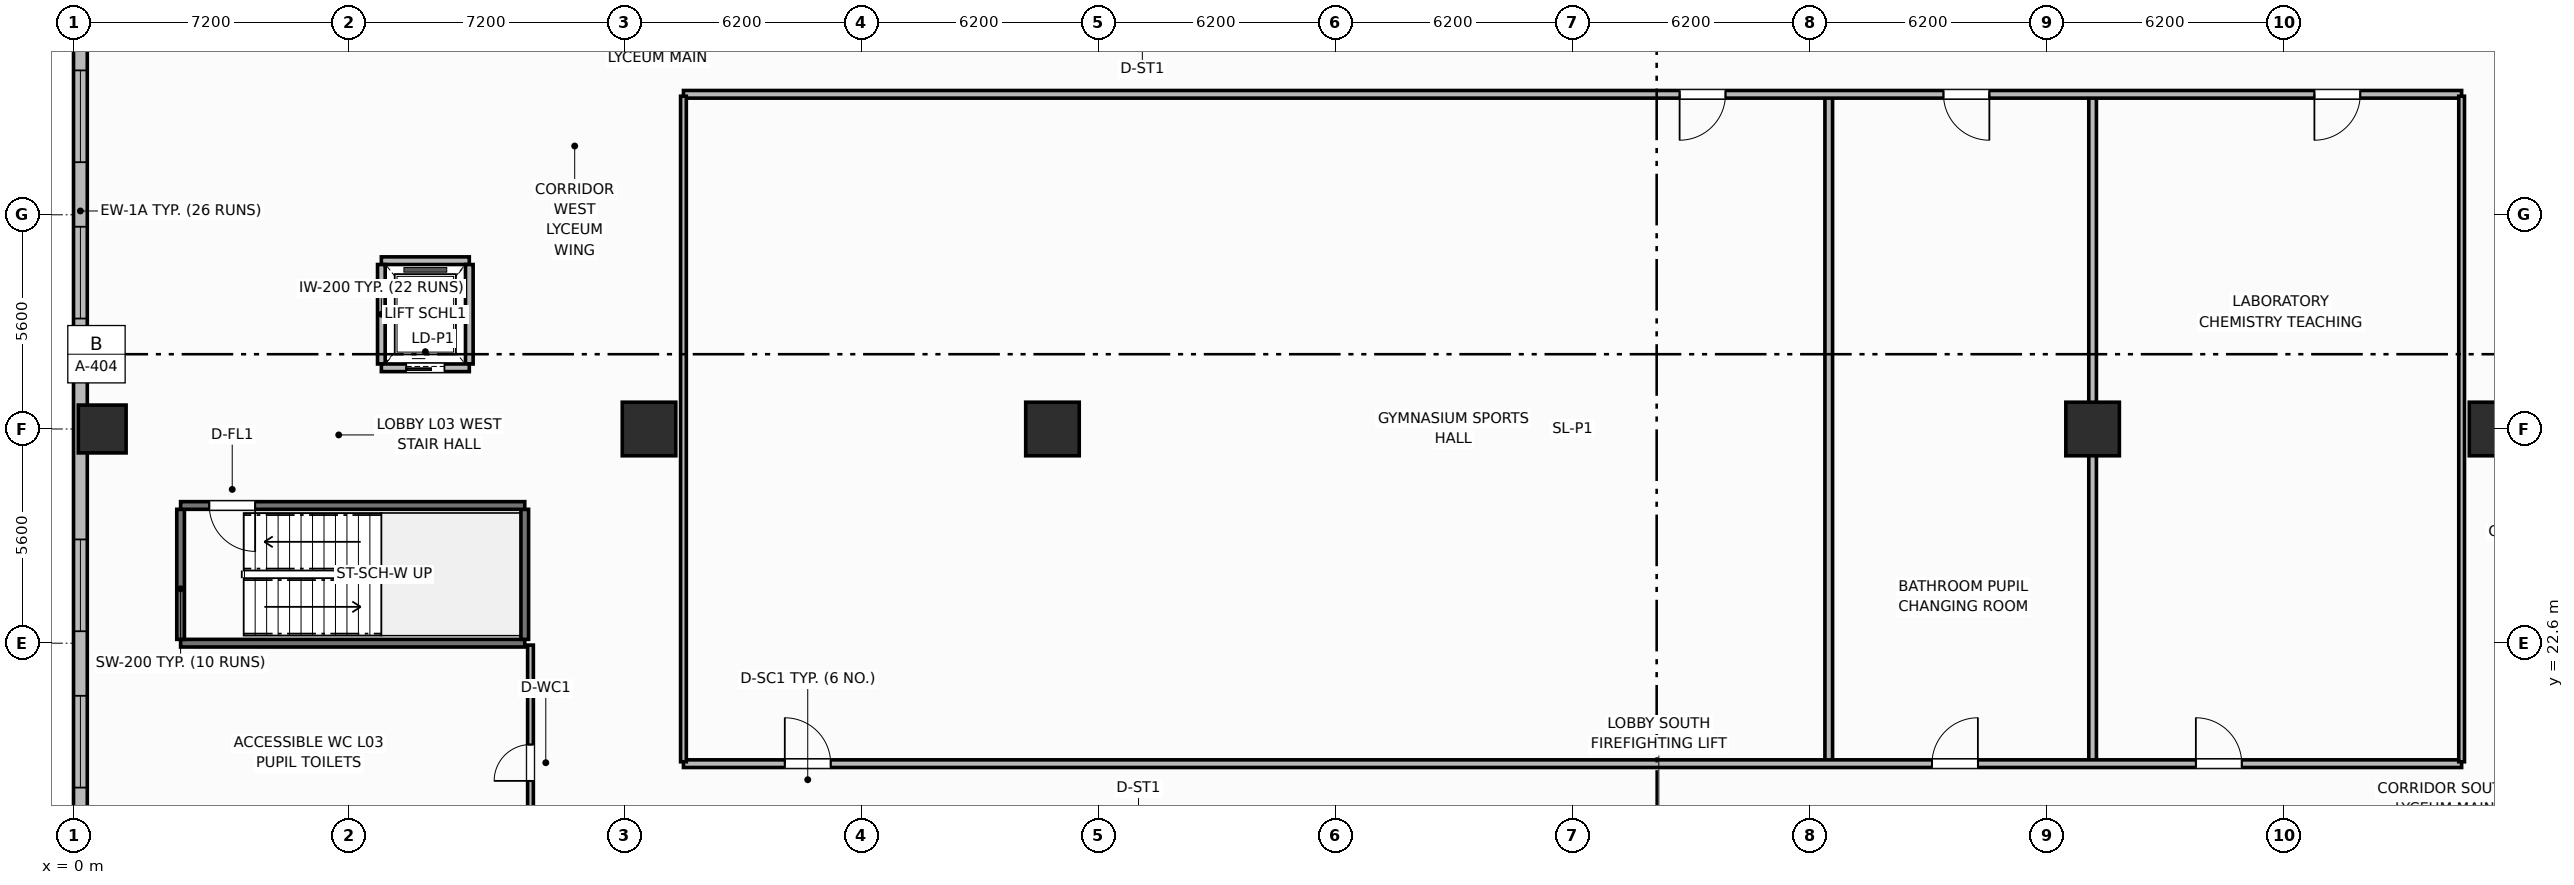
"""IFC4 building model, lengths in metres.
Left out: names, types, materials, properties, quantities, classifications, styles, units other than length and angle.
Written with IfcOpenShell. Run it as: python <this file> out.ifc"""

import sys

from ifc_helpers import new_model, si_unit, direction, frame, frame_2d, origin, origin_2d, place, context, subcontext, project, spatial, rectangle, extrude, element, fill, save


model = new_model("IFC4")
c1 = context("Model", 3, precision=1e-05, world=origin(), true_north=direction((0.0, 1.0)))
c2 = subcontext(c1, "Body", "Model", "MODEL_VIEW")
j1 = project(units=[si_unit("LENGTHUNIT", "METRE"), si_unit("PLANEANGLEUNIT", "RADIAN")], contexts=[c1])
p1 = place(None, origin())
s1 = spatial("IfcSite", under=j1, at=p1, CompositionType="ELEMENT")
p2 = place(p1, origin())
s2 = spatial("IfcBuilding", under=s1, at=p2, CompositionType="ELEMENT")
p3 = place(p2, frame((0.0, 0.0, 15.6)))
s3 = spatial("IfcBuildingStorey", under=s2, at=p3, CompositionType="ELEMENT", Elevation=15.6)
for number, where, z_axis, x_axis in (
    (1, (25.6, 28.2, 0.0), (0.0, 0.0, 1.0), (1.0, 0.0, 0.0)),
    (2, (52.8, 28.2, 0.0), (0.0, 0.0, 1.0), (1.0, 0.0, 0.0)),
):
    element("IfcColumn", number, at=place(p3, frame(where, z_axis=z_axis, x_axis=x_axis)), inside=s3, PredefinedType="COLUMN", context=c2, shape_type="SweptSolid", body=[
        extrude(rectangle(XDim=1.4, YDim=1.4, at=origin_2d()), origin(), (0.0, 0.0, 1.0), 4.5),
    ])
p4 = place(p3, frame((0.75, 28.2, 0.0), z_axis=(0.0, 0.0, 1.0), x_axis=(1.0, 0.0, 0.0)))
e3 = element("IfcColumn", 3, at=p4, inside=s3, PredefinedType="COLUMN", context=c2, shape_type="SweptSolid", body=[
    extrude(rectangle(XDim=1.25, YDim=1.25, at=origin_2d()), origin(), (0.0, 0.0, 1.0), 4.5),
])
for number, where, z_axis, x_axis in (
    (4, (15.05, 28.2, 0.0), (0.0, 0.0, 1.0), (1.0, 0.0, 0.0)),
    (5, (63.35, 28.2, 0.0), (0.0, 0.0, 1.0), (1.0, 0.0, 0.0)),
):
    element("IfcColumn", number, at=place(p3, frame(where, z_axis=z_axis, x_axis=x_axis)), inside=s3, PredefinedType="COLUMN", context=c2, shape_type="SweptSolid", body=[
        extrude(rectangle(XDim=1.4, YDim=1.4, at=origin_2d()), origin(), (0.0, 0.0, 1.0), 4.5),
    ])
p5 = place(p3, frame((0.18, 55.42, 0.0), z_axis=(0.0, 0.0, 1.0), x_axis=(0.0, -1.0, 0.0)))
e6 = element("IfcWall", 6, at=p5, inside=s3, PredefinedType="SOLIDWALL", context=c2, shape_type="SweptSolid", body=[
    extrude(rectangle(XDim=54.44, YDim=0.36, at=frame_2d((27.22, 0.0))), origin(), (0.0, 0.0, 1.0), 3.48),
])
p6 = place(p5, frame((1.494, 0.0, 0.85)))
e7 = element("IfcOpeningElement", 7, at=p6, cuts=e6, PredefinedType="OPENING", context=c2, shape_type="SweptSolid", body=[
    extrude(rectangle(XDim=2.4, YDim=2.25, at=frame_2d((1.2, 1.125))), frame((0.0, 0.19, 0.0), z_axis=(0.0, -1.0, 0.0), x_axis=(1.0, 0.0, 0.0)), (0.0, 0.0, 1.0), 0.38),
])
p7 = place(p5, frame((5.582, 0.0, 0.85)))
e8 = element("IfcOpeningElement", 8, at=p7, cuts=e6, PredefinedType="OPENING", context=c2, shape_type="SweptSolid", body=[
    extrude(rectangle(XDim=2.4, YDim=2.25, at=frame_2d((1.2, 1.125))), frame((0.0, 0.19, 0.0), z_axis=(0.0, -1.0, 0.0), x_axis=(1.0, 0.0, 0.0)), (0.0, 0.0, 1.0), 0.38),
])
p8 = place(p5, frame((17.844, 0.0, 0.85)))
e9 = element("IfcOpeningElement", 9, at=p8, cuts=e6, PredefinedType="OPENING", context=c2, shape_type="SweptSolid", body=[
    extrude(rectangle(XDim=2.4, YDim=2.25, at=frame_2d((1.2, 1.125))), frame((0.0, 0.19, 0.0), z_axis=(0.0, -1.0, 0.0), x_axis=(1.0, 0.0, 0.0)), (0.0, 0.0, 1.0), 0.38),
])
p9 = place(p5, frame((21.932, 0.0, 0.85)))
e10 = element("IfcOpeningElement", 10, at=p9, cuts=e6, PredefinedType="OPENING", context=c2, shape_type="SweptSolid", body=[
    extrude(rectangle(XDim=2.4, YDim=2.25, at=frame_2d((1.2, 1.125))), frame((0.0, 0.19, 0.0), z_axis=(0.0, -1.0, 0.0), x_axis=(1.0, 0.0, 0.0)), (0.0, 0.0, 1.0), 0.38),
])
p10 = place(p5, frame((30.108, 0.0, 0.85)))
e11 = element("IfcOpeningElement", 11, at=p10, cuts=e6, PredefinedType="OPENING", context=c2, shape_type="SweptSolid", body=[
    extrude(rectangle(XDim=2.4, YDim=2.25, at=frame_2d((1.2, 1.125))), frame((0.0, 0.19, 0.0), z_axis=(0.0, -1.0, 0.0), x_axis=(1.0, 0.0, 0.0)), (0.0, 0.0, 1.0), 0.38),
])
p11 = place(p5, frame((34.195, 0.0, 0.85)))
e12 = element("IfcOpeningElement", 12, at=p11, cuts=e6, PredefinedType="OPENING", context=c2, shape_type="SweptSolid", body=[
    extrude(rectangle(XDim=2.4, YDim=2.25, at=frame_2d((1.2, 1.125))), frame((0.0, 0.19, 0.0), z_axis=(0.0, -1.0, 0.0), x_axis=(1.0, 0.0, 0.0)), (0.0, 0.0, 1.0), 0.38),
])
p12 = place(p5, frame((46.458, 0.0, 0.85)))
e13 = element("IfcOpeningElement", 13, at=p12, cuts=e6, PredefinedType="OPENING", context=c2, shape_type="SweptSolid", body=[
    extrude(rectangle(XDim=2.4, YDim=2.25, at=frame_2d((1.2, 1.125))), frame((0.0, 0.19, 0.0), z_axis=(0.0, -1.0, 0.0), x_axis=(1.0, 0.0, 0.0)), (0.0, 0.0, 1.0), 0.38),
])
p13 = place(p5, frame((50.546, 0.0, 0.85)))
e14 = element("IfcOpeningElement", 14, at=p13, cuts=e6, PredefinedType="OPENING", context=c2, shape_type="SweptSolid", body=[
    extrude(rectangle(XDim=2.4, YDim=2.25, at=frame_2d((1.2, 1.125))), frame((0.0, 0.19, 0.0), z_axis=(0.0, -1.0, 0.0), x_axis=(1.0, 0.0, 0.0)), (0.0, 0.0, 1.0), 0.38),
])
p14 = place(p3, frame((2.8, 22.6, 0.0), z_axis=(0.0, 0.0, 1.0), x_axis=(1.0, 0.0, 0.0)))
e15 = element("IfcWall", 15, at=p14, inside=s3, PredefinedType="SHEAR", context=c2, shape_type="SweptSolid", body=[
    extrude(rectangle(XDim=9.0, YDim=0.2, at=frame_2d((4.5, 0.0))), origin(), (0.0, 0.0, 1.0), 4.5),
])
for number, where, z_axis, x_axis in (
    (16, (2.8, 22.7, 0.0), (0.0, 0.0, 1.0), (0.0, 1.0, 0.0)),
    (17, (11.8, 22.7, 0.0), (0.0, 0.0, 1.0), (0.0, 1.0, 0.0)),
):
    element("IfcWall", number, at=place(p3, frame(where, z_axis=z_axis, x_axis=x_axis)), inside=s3, PredefinedType="SHEAR", context=c2, shape_type="SweptSolid", body=[
        extrude(rectangle(XDim=3.4, YDim=0.2, at=frame_2d((1.7, 0.0))), origin(), (0.0, 0.0, 1.0), 4.5),
    ])
p15 = place(p3, frame((11.8, 26.2, 0.0), z_axis=(0.0, 0.0, 1.0), x_axis=(-1.0, 0.0, 0.0)))
e18 = element("IfcWall", 18, at=p15, inside=s3, PredefinedType="SHEAR", context=c2, shape_type="SweptSolid", body=[
    extrude(rectangle(XDim=9.0, YDim=0.2, at=frame_2d((4.5, 0.0))), origin(), (0.0, 0.0, 1.0), 4.5),
])
p16 = place(p15, frame((7.05, 0.0, 0.0)))
e19 = element("IfcOpeningElement", 19, at=p16, cuts=e18, PredefinedType="OPENING", context=c2, shape_type="SweptSolid", body=[
    extrude(rectangle(XDim=1.2, YDim=2.15, at=frame_2d((0.6, 1.075))), frame((0.0, 0.11, 0.0), z_axis=(0.0, -1.0, 0.0), x_axis=(1.0, 0.0, 0.0)), (0.0, 0.0, 1.0), 0.22),
])
p17 = place(p3, frame((8.05, 32.6, 0.0), z_axis=(0.0, 0.0, 1.0), x_axis=(1.0, 0.0, 0.0)))
e20 = element("IfcWall", 20, at=p17, inside=s3, PredefinedType="PARTITIONING", context=c2, shape_type="SweptSolid", body=[
    extrude(rectangle(XDim=2.3, YDim=0.2, at=frame_2d((1.15, 0.0))), origin(), (0.0, 0.0, 1.0), 3.42),
])
for number, where, z_axis, x_axis in (
    (21, (8.05, 29.9, 0.0), (0.0, 0.0, 1.0), (0.0, 1.0, 0.0)),
    (22, (10.35, 29.9, 0.0), (0.0, 0.0, 1.0), (0.0, 1.0, 0.0)),
):
    element("IfcWall", number, at=place(p3, frame(where, z_axis=z_axis, x_axis=x_axis)), inside=s3, PredefinedType="PARTITIONING", context=c2, shape_type="SweptSolid", body=[
        extrude(rectangle(XDim=2.6, YDim=0.2, at=frame_2d((1.3, 0.0))), origin(), (0.0, 0.0, 1.0), 3.42),
    ])
p18 = place(p3, frame((8.05, 29.8, 0.0), z_axis=(0.0, 0.0, 1.0), x_axis=(1.0, 0.0, 0.0)))
e23 = element("IfcWall", 23, at=p18, inside=s3, PredefinedType="PARTITIONING", context=c2, shape_type="SweptSolid", body=[
    extrude(rectangle(XDim=2.3, YDim=0.2, at=frame_2d((1.15, 0.0))), origin(), (0.0, 0.0, 1.0), 3.42),
])
p19 = place(p18, frame((0.65, 0.0, 0.0)))
e24 = element("IfcOpeningElement", 24, at=p19, cuts=e23, PredefinedType="OPENING", context=c2, shape_type="SweptSolid", body=[
    extrude(rectangle(XDim=1.0, YDim=2.15, at=frame_2d((0.5, 1.075))), frame((0.0, 0.11, 0.0), z_axis=(0.0, -1.0, 0.0), x_axis=(1.0, 0.0, 0.0)), (0.0, 0.0, 1.0), 0.22),
])
for number, where, z_axis, x_axis in (
    (25, (45.9, 19.5, 0.0), (0.0, 0.0, 1.0), (0.0, 1.0, 0.0)),
    (26, (52.8, 19.5, 0.0), (0.0, 0.0, 1.0), (0.0, 1.0, 0.0)),
):
    element("IfcWall", number, at=place(p3, frame(where, z_axis=z_axis, x_axis=x_axis)), inside=s3, PredefinedType="PARTITIONING", context=c2, shape_type="SweptSolid", body=[
        extrude(rectangle(XDim=17.4, YDim=0.2, at=frame_2d((8.7, 0.0))), origin(), (0.0, 0.0, 1.0), 3.42),
    ])
p20 = place(p3, frame((15.95, 19.45, 0.0), z_axis=(0.0, 0.0, 1.0), x_axis=(1.0, 0.0, 0.0)))
e27 = element("IfcWall", 27, at=p20, inside=s3, PredefinedType="PARTITIONING", context=c2, shape_type="SweptSolid", body=[
    extrude(rectangle(XDim=46.5, YDim=0.2, at=frame_2d((23.25, 0.0))), origin(), (0.0, 0.0, 1.0), 3.42),
])
p21 = place(p20, frame((2.65, 0.0, 0.0)))
e28 = element("IfcOpeningElement", 28, at=p21, cuts=e27, PredefinedType="OPENING", context=c2, shape_type="SweptSolid", body=[
    extrude(rectangle(XDim=1.2, YDim=2.15, at=frame_2d((0.6, 1.075))), frame((0.0, 0.11, 0.0), z_axis=(0.0, -1.0, 0.0), x_axis=(1.0, 0.0, 0.0)), (0.0, 0.0, 1.0), 0.22),
])
p22 = place(p20, frame((32.65, 0.0, 0.0)))
e29 = element("IfcOpeningElement", 29, at=p22, cuts=e27, PredefinedType="OPENING", context=c2, shape_type="SweptSolid", body=[
    extrude(rectangle(XDim=1.2, YDim=2.15, at=frame_2d((0.6, 1.075))), frame((0.0, 0.11, 0.0), z_axis=(0.0, -1.0, 0.0), x_axis=(1.0, 0.0, 0.0)), (0.0, 0.0, 1.0), 0.22),
])
p23 = place(p20, frame((39.55, 0.0, 0.0)))
e30 = element("IfcOpeningElement", 30, at=p23, cuts=e27, PredefinedType="OPENING", context=c2, shape_type="SweptSolid", body=[
    extrude(rectangle(XDim=1.2, YDim=2.15, at=frame_2d((0.6, 1.075))), frame((0.0, 0.11, 0.0), z_axis=(0.0, -1.0, 0.0), x_axis=(1.0, 0.0, 0.0)), (0.0, 0.0, 1.0), 0.22),
])
p24 = place(p3, frame((62.45, 36.95, 0.0), z_axis=(0.0, 0.0, 1.0), x_axis=(-1.0, 0.0, 0.0)))
e31 = element("IfcWall", 31, at=p24, inside=s3, PredefinedType="PARTITIONING", context=c2, shape_type="SweptSolid", body=[
    extrude(rectangle(XDim=46.5, YDim=0.2, at=frame_2d((23.25, 0.0))), origin(), (0.0, 0.0, 1.0), 3.42),
])
p25 = place(p24, frame((19.25, 0.0, 0.0)))
e32 = element("IfcOpeningElement", 32, at=p25, cuts=e31, PredefinedType="OPENING", context=c2, shape_type="SweptSolid", body=[
    extrude(rectangle(XDim=1.2, YDim=2.15, at=frame_2d((0.6, 1.075))), frame((0.0, 0.11, 0.0), z_axis=(0.0, -1.0, 0.0), x_axis=(1.0, 0.0, 0.0)), (0.0, 0.0, 1.0), 0.22),
])
p26 = place(p24, frame((12.35, 0.0, 0.0)))
e33 = element("IfcOpeningElement", 33, at=p26, cuts=e31, PredefinedType="OPENING", context=c2, shape_type="SweptSolid", body=[
    extrude(rectangle(XDim=1.2, YDim=2.15, at=frame_2d((0.6, 1.075))), frame((0.0, 0.11, 0.0), z_axis=(0.0, -1.0, 0.0), x_axis=(1.0, 0.0, 0.0)), (0.0, 0.0, 1.0), 0.22),
])
p27 = place(p24, frame((2.65, 0.0, 0.0)))
e34 = element("IfcOpeningElement", 34, at=p27, cuts=e31, PredefinedType="OPENING", context=c2, shape_type="SweptSolid", body=[
    extrude(rectangle(XDim=1.2, YDim=2.15, at=frame_2d((0.6, 1.075))), frame((0.0, 0.11, 0.0), z_axis=(0.0, -1.0, 0.0), x_axis=(1.0, 0.0, 0.0)), (0.0, 0.0, 1.0), 0.22),
])
for number, where, z_axis, x_axis in (
    (35, (15.95, 19.5, 0.0), (0.0, 0.0, 1.0), (0.0, 1.0, 0.0)),
    (36, (62.45, 19.5, 0.0), (0.0, 0.0, 1.0), (0.0, 1.0, 0.0)),
):
    element("IfcWall", number, at=place(p3, frame(where, z_axis=z_axis, x_axis=x_axis)), inside=s3, PredefinedType="PARTITIONING", context=c2, shape_type="SweptSolid", body=[
        extrude(rectangle(XDim=17.4, YDim=0.15, at=frame_2d((8.7, 0.0))), origin(), (0.0, 0.0, 1.0), 3.42),
    ])
p28 = place(p3, frame((11.95, 16.9, 0.0), z_axis=(0.0, 0.0, 1.0), x_axis=(0.0, 1.0, 0.0)))
e37 = element("IfcWall", 37, at=p28, inside=s3, PredefinedType="PARTITIONING", context=c2, shape_type="SweptSolid", body=[
    extrude(rectangle(XDim=5.65, YDim=0.15, at=frame_2d((2.825, 0.0))), origin(), (0.0, 0.0, 1.0), 3.42),
])
p29 = place(p28, frame((2.1, 0.0, 0.0)))
e38 = element("IfcOpeningElement", 38, at=p29, cuts=e37, PredefinedType="OPENING", context=c2, shape_type="SweptSolid", body=[
    extrude(rectangle(XDim=0.95, YDim=2.1, at=frame_2d((0.475, 1.05))), frame((0.0, 0.085, 0.0), z_axis=(0.0, -1.0, 0.0), x_axis=(1.0, 0.0, 0.0)), (0.0, 0.0, 1.0), 0.17),
])
p30 = place(p8, origin())
e39 = element("IfcWindow", 39, at=p30, inside=s3, PartitioningType="SINGLE_PANEL", PredefinedType="WINDOW", context=c2, shape_type="SweptSolid", body=[
    extrude(rectangle(XDim=2.4, YDim=2.25, at=frame_2d((1.2, 1.125))), frame((0.0, 0.03, 0.0), z_axis=(0.0, -1.0, 0.0), x_axis=(1.0, 0.0, 0.0)), (0.0, 0.0, 1.0), 0.06),
])
fill(e9, e39)
p31 = place(p9, origin())
e40 = element("IfcWindow", 40, at=p31, inside=s3, PartitioningType="SINGLE_PANEL", PredefinedType="WINDOW", context=c2, shape_type="SweptSolid", body=[
    extrude(rectangle(XDim=2.4, YDim=2.25, at=frame_2d((1.2, 1.125))), frame((0.0, 0.03, 0.0), z_axis=(0.0, -1.0, 0.0), x_axis=(1.0, 0.0, 0.0)), (0.0, 0.0, 1.0), 0.06),
])
fill(e10, e40)
p32 = place(p10, origin())
e41 = element("IfcWindow", 41, at=p32, inside=s3, PartitioningType="SINGLE_PANEL", PredefinedType="WINDOW", context=c2, shape_type="SweptSolid", body=[
    extrude(rectangle(XDim=2.4, YDim=2.25, at=frame_2d((1.2, 1.125))), frame((0.0, 0.03, 0.0), z_axis=(0.0, -1.0, 0.0), x_axis=(1.0, 0.0, 0.0)), (0.0, 0.0, 1.0), 0.06),
])
fill(e11, e41)
p33 = place(p11, origin())
e42 = element("IfcWindow", 42, at=p33, inside=s3, PartitioningType="SINGLE_PANEL", PredefinedType="WINDOW", context=c2, shape_type="SweptSolid", body=[
    extrude(rectangle(XDim=2.4, YDim=2.25, at=frame_2d((1.2, 1.125))), frame((0.0, 0.03, 0.0), z_axis=(0.0, -1.0, 0.0), x_axis=(1.0, 0.0, 0.0)), (0.0, 0.0, 1.0), 0.06),
])
fill(e12, e42)
p34 = place(p16, origin())
e43 = element("IfcDoor", 43, at=p34, inside=s3, OperationType="SINGLE_SWING_LEFT", PredefinedType="DOOR", context=c2, shape_type="SweptSolid", body=[
    extrude(rectangle(XDim=1.2, YDim=2.15, at=frame_2d((0.6, 1.075))), frame((0.0, 0.025, 0.0), z_axis=(0.0, -1.0, 0.0), x_axis=(1.0, 0.0, 0.0)), (0.0, 0.0, 1.0), 0.05),
])
fill(e19, e43)
p35 = place(p19, origin())
e44 = element("IfcDoor", 44, at=p35, inside=s3, OperationType="SLIDING_TO_LEFT", PredefinedType="DOOR", context=c2, shape_type="SweptSolid", body=[
    extrude(rectangle(XDim=1.0, YDim=2.15, at=frame_2d((0.5, 1.075))), frame((0.0, 0.025, 0.0), z_axis=(0.0, -1.0, 0.0), x_axis=(1.0, 0.0, 0.0)), (0.0, 0.0, 1.0), 0.05),
])
fill(e24, e44)
p36 = place(p21, origin())
e45 = element("IfcDoor", 45, at=p36, inside=s3, OperationType="SINGLE_SWING_LEFT", PredefinedType="DOOR", context=c2, shape_type="SweptSolid", body=[
    extrude(rectangle(XDim=1.2, YDim=2.15, at=frame_2d((0.6, 1.075))), frame((0.0, 0.025, 0.0), z_axis=(0.0, -1.0, 0.0), x_axis=(1.0, 0.0, 0.0)), (0.0, 0.0, 1.0), 0.05),
])
fill(e28, e45)
p37 = place(p22, origin())
e46 = element("IfcDoor", 46, at=p37, inside=s3, OperationType="SINGLE_SWING_RIGHT", PredefinedType="DOOR", context=c2, shape_type="SweptSolid", body=[
    extrude(rectangle(XDim=1.2, YDim=2.15, at=frame_2d((0.6, 1.075))), frame((0.0, 0.025, 0.0), z_axis=(0.0, -1.0, 0.0), x_axis=(1.0, 0.0, 0.0)), (0.0, 0.0, 1.0), 0.05),
])
fill(e29, e46)
p38 = place(p23, origin())
e47 = element("IfcDoor", 47, at=p38, inside=s3, OperationType="SINGLE_SWING_LEFT", PredefinedType="DOOR", context=c2, shape_type="SweptSolid", body=[
    extrude(rectangle(XDim=1.2, YDim=2.15, at=frame_2d((0.6, 1.075))), frame((0.0, 0.025, 0.0), z_axis=(0.0, -1.0, 0.0), x_axis=(1.0, 0.0, 0.0)), (0.0, 0.0, 1.0), 0.05),
])
fill(e30, e47)
p39 = place(p25, origin())
e48 = element("IfcDoor", 48, at=p39, inside=s3, OperationType="SINGLE_SWING_RIGHT", PredefinedType="DOOR", context=c2, shape_type="SweptSolid", body=[
    extrude(rectangle(XDim=1.2, YDim=2.15, at=frame_2d((0.6, 1.075))), frame((0.0, 0.025, 0.0), z_axis=(0.0, -1.0, 0.0), x_axis=(1.0, 0.0, 0.0)), (0.0, 0.0, 1.0), 0.05),
])
fill(e32, e48)
p40 = place(p26, origin())
e49 = element("IfcDoor", 49, at=p40, inside=s3, OperationType="SINGLE_SWING_LEFT", PredefinedType="DOOR", context=c2, shape_type="SweptSolid", body=[
    extrude(rectangle(XDim=1.2, YDim=2.15, at=frame_2d((0.6, 1.075))), frame((0.0, 0.025, 0.0), z_axis=(0.0, -1.0, 0.0), x_axis=(1.0, 0.0, 0.0)), (0.0, 0.0, 1.0), 0.05),
])
fill(e33, e49)
p41 = place(p27, origin())
e50 = element("IfcDoor", 50, at=p41, inside=s3, OperationType="SINGLE_SWING_RIGHT", PredefinedType="DOOR", context=c2, shape_type="SweptSolid", body=[
    extrude(rectangle(XDim=1.2, YDim=2.15, at=frame_2d((0.6, 1.075))), frame((0.0, 0.025, 0.0), z_axis=(0.0, -1.0, 0.0), x_axis=(1.0, 0.0, 0.0)), (0.0, 0.0, 1.0), 0.05),
])
fill(e34, e50)
p42 = place(p29, origin())
e51 = element("IfcDoor", 51, at=p42, inside=s3, OperationType="SINGLE_SWING_LEFT", PredefinedType="DOOR", context=c2, shape_type="SweptSolid", body=[
    extrude(rectangle(XDim=0.95, YDim=2.1, at=frame_2d((0.475, 1.05))), frame((0.0, 0.025, 0.0), z_axis=(0.0, -1.0, 0.0), x_axis=(1.0, 0.0, 0.0)), (0.0, 0.0, 1.0), 0.05),
])
fill(e38, e51)
save(model, sys.argv[1])
